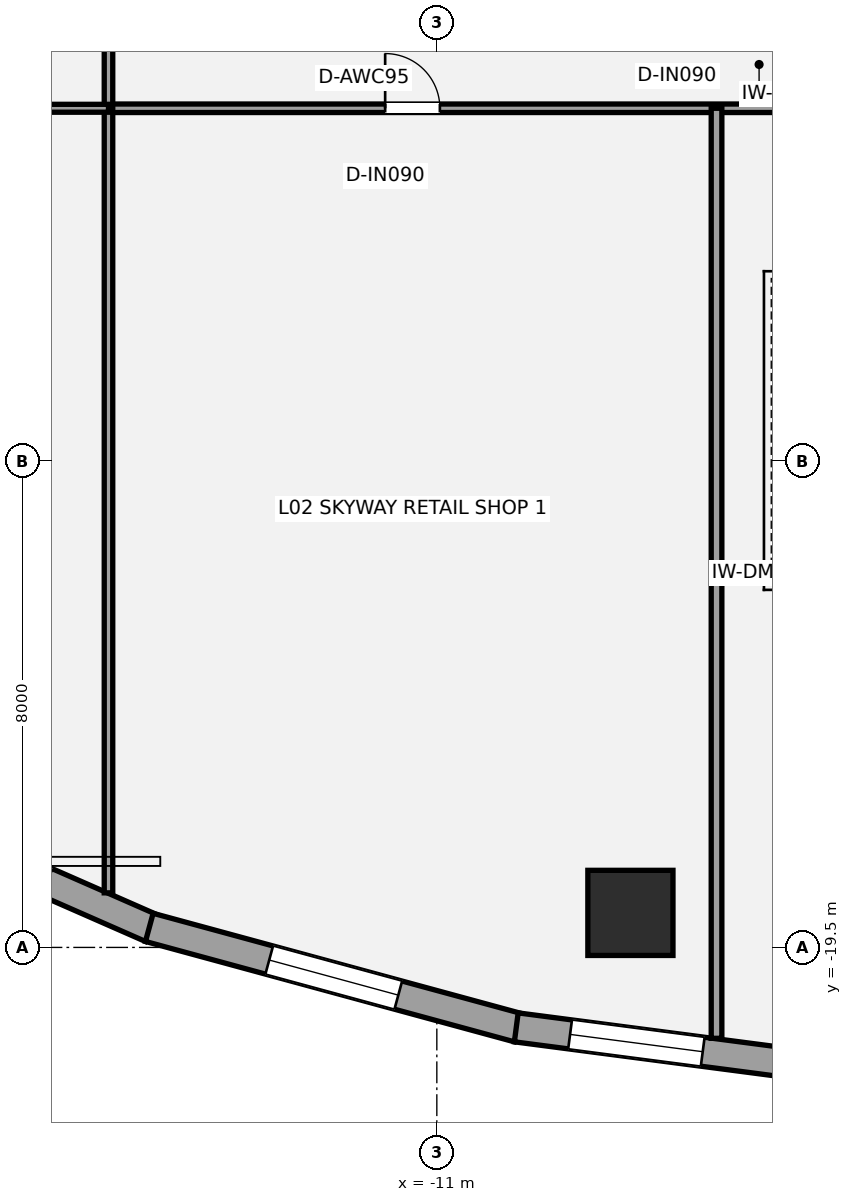
"""IFC4 building model, lengths in metres.
Left out: names, types, materials, properties, quantities, classifications, styles, units other than length and angle.
Written with IfcOpenShell. Run it as: python <this file> out.ifc"""

import sys

from ifc_helpers import new_model, si_unit, direction, frame, frame_2d, origin, origin_2d, place, context, subcontext, project, spatial, rectangle, hollow_circle, extrude, element, fill, save


model = new_model("IFC4")
c1 = context("Model", 3, precision=1e-05, world=origin(), true_north=direction((0.0, 1.0)))
c2 = subcontext(c1, "Body", "Model", "MODEL_VIEW")
j1 = project(units=[si_unit("LENGTHUNIT", "METRE"), si_unit("PLANEANGLEUNIT", "RADIAN")], contexts=[c1])
p1 = place(None, origin())
s1 = spatial("IfcSite", under=j1, at=p1, CompositionType="ELEMENT")
p2 = place(p1, origin())
s2 = spatial("IfcBuilding", under=s1, at=p2, CompositionType="ELEMENT")
p3 = place(p2, frame((0.0, 0.0, 10.2)))
s3 = spatial("IfcBuildingStorey", under=s2, at=p3, CompositionType="ELEMENT", Elevation=10.2)
p4 = place(p3, frame((-7.816, -18.932, 0.0), z_axis=(0.0, 0.0, 1.0), x_axis=(1.0, 0.0, 0.0)))
e1 = element("IfcColumn", 1, at=p4, inside=s3, PredefinedType="USERDEFINED", context=c2, shape_type="SweptSolid", body=[
    extrude(hollow_circle(Radius=0.7, WallThickness=0.05, at=origin_2d()), origin(), (0.0, 0.0, 1.0), 4.2),
])
p5 = place(p3, frame((-15.695, -19.183, 0.0), z_axis=(0.0, 0.0, 1.0), x_axis=(-0.91570760638, 0.401845218484, 0.0)))
e2 = element("IfcWall", 2, at=p5, inside=s3, PredefinedType="STANDARD", context=c2, shape_type="SweptSolid", body=[
    extrude(rectangle(XDim=5.963, YDim=0.48, at=frame_2d((2.981, 0.0))), origin(), (0.0, 0.0, 1.0), 3.109),
])
p6 = place(p5, frame((1.882, 0.0, 0.7)))
e3 = element("IfcOpeningElement", 3, at=p6, cuts=e2, PredefinedType="OPENING", context=c2, shape_type="SweptSolid", body=[
    extrude(rectangle(XDim=2.2, YDim=1.95, at=frame_2d((1.1, 0.975))), frame((0.0, 0.25, 0.0), z_axis=(0.0, -1.0, 0.0), x_axis=(1.0, 0.0, 0.0)), (0.0, 0.0, 1.0), 0.5),
])
p7 = place(p3, frame((-9.662, -20.821, 0.0), z_axis=(0.0, 0.0, 1.0), x_axis=(-0.964936550718, 0.262483243445, 0.0)))
e4 = element("IfcWall", 4, at=p7, inside=s3, PredefinedType="STANDARD", context=c2, shape_type="SweptSolid", body=[
    extrude(rectangle(XDim=6.288, YDim=0.48, at=frame_2d((3.144, 0.0))), origin(), (0.0, 0.0, 1.0), 3.109),
])
p8 = place(p7, frame((2.044, 0.0, 0.7)))
e5 = element("IfcOpeningElement", 5, at=p8, cuts=e4, PredefinedType="OPENING", context=c2, shape_type="SweptSolid", body=[
    extrude(rectangle(XDim=2.2, YDim=1.95, at=frame_2d((1.1, 0.975))), frame((0.0, 0.25, 0.0), z_axis=(0.0, -1.0, 0.0), x_axis=(1.0, 0.0, 0.0)), (0.0, 0.0, 1.0), 0.5),
])
p9 = place(p3, frame((-3.143, -21.67, 0.0), z_axis=(0.0, 0.0, 1.0), x_axis=(-0.991574010877, 0.129541425626, 0.0)))
e6 = element("IfcWall", 6, at=p9, inside=s3, PredefinedType="STANDARD", context=c2, shape_type="SweptSolid", body=[
    extrude(rectangle(XDim=6.606, YDim=0.48, at=frame_2d((3.303, 0.0))), origin(), (0.0, 0.0, 1.0), 3.109),
])
p10 = place(p9, frame((3.513, 0.0, 0.7)))
e7 = element("IfcOpeningElement", 7, at=p10, cuts=e6, PredefinedType="OPENING", context=c2, shape_type="SweptSolid", body=[
    extrude(rectangle(XDim=2.2, YDim=1.95, at=frame_2d((1.1, 0.975))), frame((0.0, 0.25, 0.0), z_axis=(0.0, -1.0, 0.0), x_axis=(1.0, 0.0, 0.0)), (0.0, 0.0, 1.0), 0.5),
])
p11 = place(p3, frame((-16.4, -5.7, 0.0), z_axis=(0.0, 0.0, 1.0), x_axis=(1.0, 0.0, 0.0)))
e8 = element("IfcWall", 8, at=p11, inside=s3, PredefinedType="PARTITIONING", context=c2, shape_type="SweptSolid", body=[
    extrude(rectangle(XDim=32.8, YDim=0.14, at=frame_2d((16.4, 0.0))), origin(), (0.0, 0.0, 1.0), 3.98),
])
p12 = place(p11, frame((4.55, 0.0, 0.0)))
e9 = element("IfcOpeningElement", 9, at=p12, cuts=e8, PredefinedType="OPENING", context=c2, shape_type="SweptSolid", body=[
    extrude(rectangle(XDim=0.9, YDim=2.1, at=frame_2d((0.45, 1.05))), frame((0.0, 0.08, 0.0), z_axis=(0.0, -1.0, 0.0), x_axis=(1.0, 0.0, 0.0)), (0.0, 0.0, 1.0), 0.16),
])
p13 = place(p11, frame((15.95, 0.0, 0.0)))
e10 = element("IfcOpeningElement", 10, at=p13, cuts=e8, PredefinedType="OPENING", context=c2, shape_type="SweptSolid", body=[
    extrude(rectangle(XDim=0.9, YDim=2.1, at=frame_2d((0.45, 1.05))), frame((0.0, 0.08, 0.0), z_axis=(0.0, -1.0, 0.0), x_axis=(1.0, 0.0, 0.0)), (0.0, 0.0, 1.0), 0.16),
])
p14 = place(p11, frame((27.05, 0.0, 0.0)))
e11 = element("IfcOpeningElement", 11, at=p14, cuts=e8, PredefinedType="OPENING", context=c2, shape_type="SweptSolid", body=[
    extrude(rectangle(XDim=1.5, YDim=2.15, at=frame_2d((0.75, 1.075))), frame((0.0, 0.08, 0.0), z_axis=(0.0, -1.0, 0.0), x_axis=(1.0, 0.0, 0.0)), (0.0, 0.0, 1.0), 0.16),
])
p15 = place(p3, frame((-16.4, -18.603, 0.0), z_axis=(0.0, 0.0, 1.0), x_axis=(0.0, 1.0, 0.0)))
e12 = element("IfcWall", 12, at=p15, inside=s3, PredefinedType="PARTITIONING", context=c2, shape_type="SweptSolid", body=[
    extrude(rectangle(XDim=26.153, YDim=0.14, at=frame_2d((13.076, 0.0))), origin(), (0.0, 0.0, 1.0), 3.348),
])
p16 = place(p15, frame((14.802, 0.0, 0.0)))
e13 = element("IfcOpeningElement", 13, at=p16, cuts=e12, PredefinedType="OPENING", context=c2, shape_type="SweptSolid", body=[
    extrude(rectangle(XDim=0.9, YDim=2.1, at=frame_2d((0.45, 1.05))), frame((0.0, 0.08, 0.0), z_axis=(0.0, -1.0, 0.0), x_axis=(1.0, 0.0, 0.0)), (0.0, 0.0, 1.0), 0.16),
])
p17 = place(p15, frame((19.552, 0.0, 0.0)))
e14 = element("IfcOpeningElement", 14, at=p17, cuts=e12, PredefinedType="OPENING", context=c2, shape_type="SweptSolid", body=[
    extrude(rectangle(XDim=0.9, YDim=2.1, at=frame_2d((0.45, 1.05))), frame((0.0, 0.08, 0.0), z_axis=(0.0, -1.0, 0.0), x_axis=(1.0, 0.0, 0.0)), (0.0, 0.0, 1.0), 0.16),
])
p18 = place(p15, frame((23.827, 0.0, 0.0)))
e15 = element("IfcOpeningElement", 15, at=p18, cuts=e12, PredefinedType="OPENING", context=c2, shape_type="SweptSolid", body=[
    extrude(rectangle(XDim=0.9, YDim=2.1, at=frame_2d((0.45, 1.05))), frame((0.0, 0.08, 0.0), z_axis=(0.0, -1.0, 0.0), x_axis=(1.0, 0.0, 0.0)), (0.0, 0.0, 1.0), 0.16),
])
p19 = place(p3, frame((-6.4, -20.995, 0.0), z_axis=(0.0, 0.0, 1.0), x_axis=(0.0, 1.0, 0.0)))
e16 = element("IfcWall", 16, at=p19, inside=s3, PredefinedType="PARTITIONING", context=c2, shape_type="SweptSolid", body=[
    extrude(rectangle(XDim=15.295, YDim=0.175, at=frame_2d((7.647, 0.0))), origin(), (0.0, 0.0, 1.0), 3.348),
])
p20 = place(p3, frame((-31.756, -5.7, 0.0), z_axis=(0.0, 0.0, 1.0), x_axis=(1.0, 0.0, 0.0)))
e17 = element("IfcWall", 17, at=p20, inside=s3, PredefinedType="PARTITIONING", context=c2, shape_type="SweptSolid", body=[
    extrude(rectangle(XDim=15.356, YDim=0.13, at=frame_2d((7.678, 0.0))), origin(), (0.0, 0.0, 1.0), 2.958),
])
p21 = place(p20, frame((0.39, 0.0, 0.0)))
e18 = element("IfcOpeningElement", 18, at=p21, cuts=e17, PredefinedType="OPENING", context=c2, shape_type="SweptSolid", body=[
    extrude(rectangle(XDim=0.9, YDim=2.1, at=frame_2d((0.45, 1.05))), frame((0.0, 0.075, 0.0), z_axis=(0.0, -1.0, 0.0), x_axis=(1.0, 0.0, 0.0)), (0.0, 0.0, 1.0), 0.15),
])
p22 = place(p8, origin())
e19 = element("IfcWindow", 19, at=p22, inside=s3, PartitioningType="SINGLE_PANEL", PredefinedType="WINDOW", context=c2, shape_type="SweptSolid", body=[
    extrude(rectangle(XDim=2.2, YDim=1.95, at=frame_2d((1.1, 0.975))), frame((0.0, -0.01, 0.0), z_axis=(0.0, -1.0, 0.0), x_axis=(1.0, 0.0, 0.0)), (0.0, 0.0, 1.0), 0.06),
])
fill(e5, e19)
p23 = place(p10, origin())
e20 = element("IfcWindow", 20, at=p23, inside=s3, PartitioningType="SINGLE_PANEL", PredefinedType="WINDOW", context=c2, shape_type="SweptSolid", body=[
    extrude(rectangle(XDim=2.2, YDim=1.95, at=frame_2d((1.1, 0.975))), frame((0.0, -0.01, 0.0), z_axis=(0.0, -1.0, 0.0), x_axis=(1.0, 0.0, 0.0)), (0.0, 0.0, 1.0), 0.06),
])
fill(e7, e20)
p24 = place(p12, origin())
e21 = element("IfcDoor", 21, at=p24, inside=s3, OperationType="SINGLE_SWING_LEFT", PredefinedType="DOOR", context=c2, shape_type="SweptSolid", body=[
    extrude(rectangle(XDim=0.9, YDim=2.1, at=frame_2d((0.45, 1.05))), frame((0.0, 0.025, 0.0), z_axis=(0.0, -1.0, 0.0), x_axis=(1.0, 0.0, 0.0)), (0.0, 0.0, 1.0), 0.05),
])
fill(e9, e21)
save(model, sys.argv[1])
